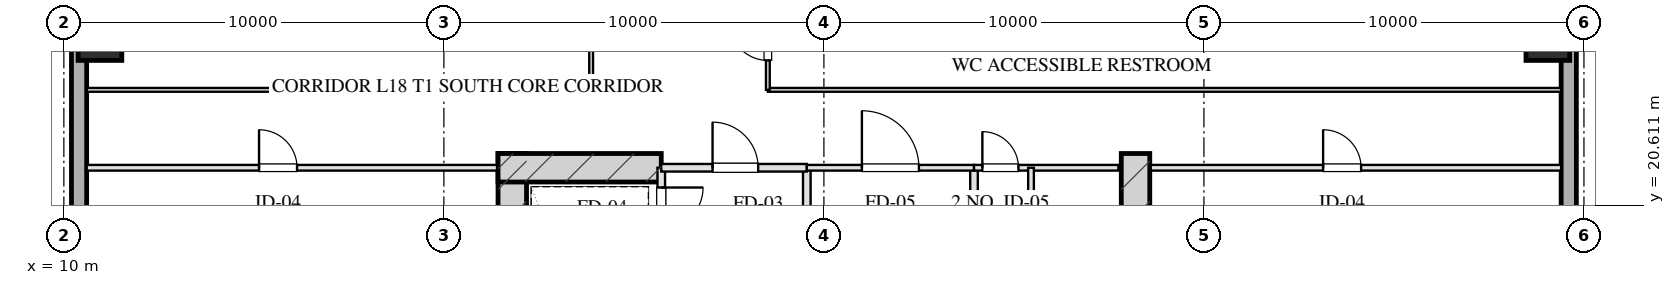
"""IFC4 building model, lengths in metres.
Left out: names, types, materials, properties, quantities, classifications, styles, units other than length and angle.
Written with IfcOpenShell. Run it as: python <this file> out.ifc"""

import sys

from ifc_helpers import new_model, si_unit, direction, frame, frame_2d, origin, origin_2d, place, context, subcontext, project, spatial, rectangle, hollow_rectangle, extrude, element, fill, save


model = new_model("IFC4")
c1 = context("Model", 3, precision=1e-05, world=origin(), true_north=direction((0.0, 1.0)))
c2 = subcontext(c1, "Body", "Model", "MODEL_VIEW")
j1 = project(units=[si_unit("LENGTHUNIT", "METRE"), si_unit("PLANEANGLEUNIT", "RADIAN")], contexts=[c1])
p1 = place(None, origin())
s1 = spatial("IfcSite", under=j1, at=p1, CompositionType="ELEMENT")
p2 = place(p1, origin())
s2 = spatial("IfcBuilding", under=s1, at=p2, CompositionType="ELEMENT")
p3 = place(p2, frame((0.0, 0.0, 74.75)))
s3 = spatial("IfcBuildingStorey", under=s2, at=p3, CompositionType="ELEMENT", Elevation=74.75)
for number, where, z_axis, x_axis in (
    (1, (21.8, 21.975, 0.0), (0.0, 0.0, 1.0), (0.0, -1.0, 0.0)),
    (2, (38.2, 21.975, 0.0), (0.0, 0.0, 1.0), (0.0, -1.0, 0.0)),
):
    element("IfcWall", number, at=place(p3, frame(where, z_axis=z_axis, x_axis=x_axis)), inside=s3, PredefinedType="SHEAR", context=c2, shape_type="SweptSolid", body=[
        extrude(rectangle(XDim=9.63, YDim=0.75, at=frame_2d((4.815, 0.0))), origin(), (0.0, 0.0, 1.0), 3.45),
    ])
p4 = place(p3, frame((21.425, 21.6, 0.0), z_axis=(0.0, 0.0, 1.0), x_axis=(1.0, 0.0, 0.0)))
e3 = element("IfcWall", 3, at=p4, inside=s3, PredefinedType="SHEAR", context=c2, shape_type="SweptSolid", body=[
    extrude(rectangle(XDim=4.295, YDim=0.75, at=frame_2d((2.147, 0.0))), origin(), (0.0, 0.0, 1.0), 3.45),
])
for number, where, z_axis, x_axis in (
    (4, (10.95, 25.0, 0.0), (0.0, 0.0, 1.0), (1.0, 0.0, 0.0)),
    (5, (49.05, 25.0, 0.0), (0.0, 0.0, 1.0), (1.0, 0.0, 0.0)),
):
    element("IfcColumn", number, at=place(p3, frame(where, z_axis=z_axis, x_axis=x_axis)), inside=s3, PredefinedType="COLUMN", context=c2, shape_type="SweptSolid", body=[
        extrude(hollow_rectangle(XDim=1.15, YDim=1.15, WallThickness=0.04, at=origin_2d()), origin(), (0.0, 0.0, 1.0), 3.451),
    ])
p5 = place(p3, frame((10.4, 7.2, 0.0), z_axis=(0.0, 0.0, 1.0), x_axis=(0.0, 1.0, 0.0)))
e6 = element("IfcWall", 6, at=p5, inside=s3, PredefinedType="SOLIDWALL", context=c2, shape_type="SweptSolid", body=[
    extrude(rectangle(XDim=53.6, YDim=0.4, at=frame_2d((26.8, 0.0))), origin(), (0.0, 0.0, 1.0), 2.61),
])
p6 = place(p5, frame((19.15, 0.0, 0.75)))
e7 = element("IfcOpeningElement", 7, at=p6, cuts=e6, PredefinedType="OPENING", context=c2, shape_type="SweptSolid", body=[
    extrude(rectangle(XDim=2.5, YDim=1.46, at=frame_2d((1.25, 0.73))), frame((0.0, 0.21, 0.0), z_axis=(0.0, -1.0, 0.0), x_axis=(1.0, 0.0, 0.0)), (0.0, 0.0, 1.0), 0.42),
])
p7 = place(p5, frame((28.15, 0.0, 0.75)))
e8 = element("IfcOpeningElement", 8, at=p7, cuts=e6, PredefinedType="OPENING", context=c2, shape_type="SweptSolid", body=[
    extrude(rectangle(XDim=2.5, YDim=1.46, at=frame_2d((1.25, 0.73))), frame((0.0, 0.21, 0.0), z_axis=(0.0, -1.0, 0.0), x_axis=(1.0, 0.0, 0.0)), (0.0, 0.0, 1.0), 0.42),
])
p8 = place(p5, frame((31.95, 0.0, 0.75)))
e9 = element("IfcOpeningElement", 9, at=p8, cuts=e6, PredefinedType="OPENING", context=c2, shape_type="SweptSolid", body=[
    extrude(rectangle(XDim=2.5, YDim=1.46, at=frame_2d((1.25, 0.73))), frame((0.0, 0.21, 0.0), z_axis=(0.0, -1.0, 0.0), x_axis=(1.0, 0.0, 0.0)), (0.0, 0.0, 1.0), 0.42),
])
p9 = place(p3, frame((49.6, 60.8, 0.0), z_axis=(0.0, 0.0, 1.0), x_axis=(0.0, -1.0, 0.0)))
e10 = element("IfcWall", 10, at=p9, inside=s3, PredefinedType="SOLIDWALL", context=c2, shape_type="SweptSolid", body=[
    extrude(rectangle(XDim=53.6, YDim=0.4, at=frame_2d((26.8, 0.0))), origin(), (0.0, 0.0, 1.0), 2.61),
])
p10 = place(p3, frame((25.72, 21.6, 0.0), z_axis=(0.0, 0.0, 1.0), x_axis=(0.0, -1.0, 0.0)))
e11 = element("IfcWall", 11, at=p10, inside=s3, PredefinedType="PARTITIONING", context=c2, shape_type="SweptSolid", body=[
    extrude(rectangle(XDim=1.9, YDim=0.2, at=frame_2d((0.95, 0.0))), origin(), (0.0, 0.0, 1.0), 3.175),
])
p11 = place(p10, frame((0.52, 0.0, 0.0)))
e12 = element("IfcOpeningElement", 12, at=p11, cuts=e11, PredefinedType="OPENING", context=c2, shape_type="SweptSolid", body=[
    extrude(rectangle(XDim=1.1, YDim=2.05, at=frame_2d((0.55, 1.025))), frame((0.0, 0.11, 0.0), z_axis=(0.0, -1.0, 0.0), x_axis=(1.0, 0.0, 0.0)), (0.0, 0.0, 1.0), 0.22),
])
p12 = place(p3, frame((29.55, 21.6, 0.0), z_axis=(0.0, 0.0, 1.0), x_axis=(0.0, -1.0, 0.0)))
e13 = element("IfcWall", 13, at=p12, inside=s3, PredefinedType="PARTITIONING", context=c2, shape_type="SweptSolid", body=[
    extrude(rectangle(XDim=8.43, YDim=0.2, at=frame_2d((4.215, 0.0))), origin(), (0.0, 0.0, 1.0), 3.175),
])
p13 = place(p3, frame((25.72, 21.6, 0.0), z_axis=(0.0, 0.0, 1.0), x_axis=(1.0, 0.0, 0.0)))
e14 = element("IfcWall", 14, at=p13, inside=s3, PredefinedType="PARTITIONING", context=c2, shape_type="SweptSolid", body=[
    extrude(rectangle(XDim=3.83, YDim=0.2, at=frame_2d((1.915, 0.0))), origin(), (0.0, 0.0, 1.0), 3.175),
])
p14 = place(p13, frame((1.35, 0.0, 0.0)))
e15 = element("IfcOpeningElement", 15, at=p14, cuts=e14, PredefinedType="OPENING", context=c2, shape_type="SweptSolid", body=[
    extrude(rectangle(XDim=1.2, YDim=2.05, at=frame_2d((0.6, 1.025))), frame((0.0, 0.11, 0.0), z_axis=(0.0, -1.0, 0.0), x_axis=(1.0, 0.0, 0.0)), (0.0, 0.0, 1.0), 0.22),
])
p15 = place(p3, frame((33.95, 21.6, 0.0), z_axis=(0.0, 0.0, 1.0), x_axis=(0.0, -1.0, 0.0)))
e16 = element("IfcWall", 16, at=p15, inside=s3, PredefinedType="PARTITIONING", context=c2, shape_type="SweptSolid", body=[
    extrude(rectangle(XDim=8.43, YDim=0.2, at=frame_2d((4.215, 0.0))), origin(), (0.0, 0.0, 1.0), 3.175),
])
p16 = place(p3, frame((29.55, 21.6, 0.0), z_axis=(0.0, 0.0, 1.0), x_axis=(1.0, 0.0, 0.0)))
e17 = element("IfcWall", 17, at=p16, inside=s3, PredefinedType="PARTITIONING", context=c2, shape_type="SweptSolid", body=[
    extrude(rectangle(XDim=4.4, YDim=0.15, at=frame_2d((2.2, 0.0))), origin(), (0.0, 0.0, 1.0), 3.175),
])
p17 = place(p16, frame((1.45, 0.0, 0.0)))
e18 = element("IfcOpeningElement", 18, at=p17, cuts=e17, PredefinedType="OPENING", context=c2, shape_type="SweptSolid", body=[
    extrude(rectangle(XDim=1.5, YDim=2.05, at=frame_2d((0.75, 1.025))), frame((0.0, 0.085, 0.0), z_axis=(0.0, -1.0, 0.0), x_axis=(1.0, 0.0, 0.0)), (0.0, 0.0, 1.0), 0.17),
])
p18 = place(p3, frame((33.95, 21.6, 0.0), z_axis=(0.0, 0.0, 1.0), x_axis=(1.0, 0.0, 0.0)))
e19 = element("IfcWall", 19, at=p18, inside=s3, PredefinedType="PARTITIONING", context=c2, shape_type="SweptSolid", body=[
    extrude(rectangle(XDim=3.8, YDim=0.15, at=frame_2d((1.9, 0.0))), origin(), (0.0, 0.0, 1.0), 3.175),
])
p19 = place(p18, frame((0.22, 0.0, 0.0)))
e20 = element("IfcOpeningElement", 20, at=p19, cuts=e19, PredefinedType="OPENING", context=c2, shape_type="SweptSolid", body=[
    extrude(rectangle(XDim=0.95, YDim=2.05, at=frame_2d((0.475, 1.025))), frame((0.0, 0.085, 0.0), z_axis=(0.0, -1.0, 0.0), x_axis=(1.0, 0.0, 0.0)), (0.0, 0.0, 1.0), 0.17),
])
p20 = place(p3, frame((35.45, 21.6, 0.0), z_axis=(0.0, 0.0, 1.0), x_axis=(0.0, -1.0, 0.0)))
e21 = element("IfcWall", 21, at=p20, inside=s3, PredefinedType="PARTITIONING", context=c2, shape_type="SweptSolid", body=[
    extrude(rectangle(XDim=8.43, YDim=0.15, at=frame_2d((4.215, 0.0))), origin(), (0.0, 0.0, 1.0), 2.765),
])
p21 = place(p20, frame((2.55, 0.0, 0.0)))
e22 = element("IfcOpeningElement", 22, at=p21, cuts=e21, PredefinedType="OPENING", context=c2, shape_type="SweptSolid", body=[
    extrude(rectangle(XDim=0.95, YDim=2.05, at=frame_2d((0.475, 1.025))), frame((0.0, 0.085, 0.0), z_axis=(0.0, -1.0, 0.0), x_axis=(1.0, 0.0, 0.0)), (0.0, 0.0, 1.0), 0.17),
])
p22 = place(p20, frame((5.8, 0.0, 0.0)))
e23 = element("IfcOpeningElement", 23, at=p22, cuts=e21, PredefinedType="OPENING", context=c2, shape_type="SweptSolid", body=[
    extrude(rectangle(XDim=0.9, YDim=2.05, at=frame_2d((0.45, 1.025))), frame((0.0, 0.085, 0.0), z_axis=(0.0, -1.0, 0.0), x_axis=(1.0, 0.0, 0.0)), (0.0, 0.0, 1.0), 0.17),
])
p23 = place(p3, frame((10.6, 21.6, 0.0), z_axis=(0.0, 0.0, 1.0), x_axis=(1.0, 0.0, 0.0)))
e24 = element("IfcWall", 24, at=p23, inside=s3, PredefinedType="PARTITIONING", context=c2, shape_type="SweptSolid", body=[
    extrude(rectangle(XDim=10.8, YDim=0.15, at=frame_2d((5.4, 0.0))), origin(), (0.0, 0.0, 1.0), 3.175),
])
p24 = place(p23, frame((4.536, 0.0, 0.0)))
e25 = element("IfcOpeningElement", 25, at=p24, cuts=e24, PredefinedType="OPENING", context=c2, shape_type="SweptSolid", body=[
    extrude(rectangle(XDim=1.0, YDim=2.05, at=frame_2d((0.5, 1.025))), frame((0.0, 0.085, 0.0), z_axis=(0.0, -1.0, 0.0), x_axis=(1.0, 0.0, 0.0)), (0.0, 0.0, 1.0), 0.17),
])
p25 = place(p3, frame((38.6, 21.6, 0.0), z_axis=(0.0, 0.0, 1.0), x_axis=(1.0, 0.0, 0.0)))
e26 = element("IfcWall", 26, at=p25, inside=s3, PredefinedType="PARTITIONING", context=c2, shape_type="SweptSolid", body=[
    extrude(rectangle(XDim=10.8, YDim=0.15, at=frame_2d((5.4, 0.0))), origin(), (0.0, 0.0, 1.0), 3.175),
])
p26 = place(p25, frame((4.536, 0.0, 0.0)))
e27 = element("IfcOpeningElement", 27, at=p26, cuts=e26, PredefinedType="OPENING", context=c2, shape_type="SweptSolid", body=[
    extrude(rectangle(XDim=1.0, YDim=2.05, at=frame_2d((0.5, 1.025))), frame((0.0, 0.085, 0.0), z_axis=(0.0, -1.0, 0.0), x_axis=(1.0, 0.0, 0.0)), (0.0, 0.0, 1.0), 0.17),
])
p27 = place(p3, frame((10.6, 23.65, 0.0), z_axis=(0.0, 0.0, 1.0), x_axis=(1.0, 0.0, 0.0)))
e28 = element("IfcWall", 28, at=p27, inside=s3, PredefinedType="MOVABLE", context=c2, shape_type="SweptSolid", body=[
    extrude(rectangle(XDim=13.275, YDim=0.1, at=frame_2d((6.637, 0.0))), origin(), (0.0, 0.0, 1.0), 3.175),
])
p28 = place(p3, frame((28.525, 23.65, 0.0), z_axis=(0.0, 0.0, 1.0), x_axis=(1.0, 0.0, 0.0)))
e29 = element("IfcWall", 29, at=p28, inside=s3, PredefinedType="MOVABLE", context=c2, shape_type="SweptSolid", body=[
    extrude(rectangle(XDim=20.875, YDim=0.1, at=frame_2d((10.438, 0.0))), origin(), (0.0, 0.0, 1.0), 3.175),
])
p29 = place(p3, frame((23.875, 23.65, 0.0), z_axis=(0.0, 0.0, 1.0), x_axis=(0.0, 1.0, 0.0)))
e30 = element("IfcWall", 30, at=p29, inside=s3, PredefinedType="MOVABLE", context=c2, shape_type="SweptSolid", body=[
    extrude(rectangle(XDim=20.7, YDim=0.1, at=frame_2d((10.35, 0.0))), origin(), (0.0, 0.0, 1.0), 3.175),
])
p30 = place(p29, frame((4.075, 0.0, 0.0)))
e31 = element("IfcOpeningElement", 31, at=p30, cuts=e30, PredefinedType="OPENING", context=c2, shape_type="SweptSolid", body=[
    extrude(rectangle(XDim=1.05, YDim=2.05, at=frame_2d((0.525, 1.025))), frame((0.0, 0.06, 0.0), z_axis=(0.0, -1.0, 0.0), x_axis=(1.0, 0.0, 0.0)), (0.0, 0.0, 1.0), 0.12),
])
p31 = place(p29, frame((14.425, 0.0, 0.0)))
e32 = element("IfcOpeningElement", 32, at=p31, cuts=e30, PredefinedType="OPENING", context=c2, shape_type="SweptSolid", body=[
    extrude(rectangle(XDim=1.0, YDim=2.05, at=frame_2d((0.5, 1.025))), frame((0.0, 0.06, 0.0), z_axis=(0.0, -1.0, 0.0), x_axis=(1.0, 0.0, 0.0)), (0.0, 0.0, 1.0), 0.12),
])
p32 = place(p3, frame((28.525, 23.65, 0.0), z_axis=(0.0, 0.0, 1.0), x_axis=(0.0, 1.0, 0.0)))
e33 = element("IfcWall", 33, at=p32, inside=s3, PredefinedType="MOVABLE", context=c2, shape_type="SweptSolid", body=[
    extrude(rectangle(XDim=20.7, YDim=0.1, at=frame_2d((10.35, 0.0))), origin(), (0.0, 0.0, 1.0), 3.175),
])
p33 = place(p32, frame((0.775, 0.0, 0.0)))
e34 = element("IfcOpeningElement", 34, at=p33, cuts=e33, PredefinedType="OPENING", context=c2, shape_type="SweptSolid", body=[
    extrude(rectangle(XDim=1.0, YDim=2.05, at=frame_2d((0.5, 1.025))), frame((0.0, 0.06, 0.0), z_axis=(0.0, -1.0, 0.0), x_axis=(1.0, 0.0, 0.0)), (0.0, 0.0, 1.0), 0.12),
])
p34 = place(p32, frame((3.95, 0.0, 0.0)))
e35 = element("IfcOpeningElement", 35, at=p34, cuts=e33, PredefinedType="OPENING", context=c2, shape_type="SweptSolid", body=[
    extrude(rectangle(XDim=1.0, YDim=2.05, at=frame_2d((0.5, 1.025))), frame((0.0, 0.06, 0.0), z_axis=(0.0, -1.0, 0.0), x_axis=(1.0, 0.0, 0.0)), (0.0, 0.0, 1.0), 0.12),
])
p35 = place(p32, frame((7.51, 0.0, 0.0)))
e36 = element("IfcOpeningElement", 36, at=p35, cuts=e33, PredefinedType="OPENING", context=c2, shape_type="SweptSolid", body=[
    extrude(rectangle(XDim=1.0, YDim=2.05, at=frame_2d((0.5, 1.025))), frame((0.0, 0.06, 0.0), z_axis=(0.0, -1.0, 0.0), x_axis=(1.0, 0.0, 0.0)), (0.0, 0.0, 1.0), 0.12),
])
p36 = place(p32, frame((11.51, 0.0, 0.0)))
e37 = element("IfcOpeningElement", 37, at=p36, cuts=e33, PredefinedType="OPENING", context=c2, shape_type="SweptSolid", body=[
    extrude(rectangle(XDim=0.85, YDim=2.05, at=frame_2d((0.425, 1.025))), frame((0.0, 0.06, 0.0), z_axis=(0.0, -1.0, 0.0), x_axis=(1.0, 0.0, 0.0)), (0.0, 0.0, 1.0), 0.12),
])
p37 = place(p32, frame((15.75, 0.0, 0.0)))
e38 = element("IfcOpeningElement", 38, at=p37, cuts=e33, PredefinedType="OPENING", context=c2, shape_type="SweptSolid", body=[
    extrude(rectangle(XDim=1.0, YDim=2.05, at=frame_2d((0.5, 1.025))), frame((0.0, 0.06, 0.0), z_axis=(0.0, -1.0, 0.0), x_axis=(1.0, 0.0, 0.0)), (0.0, 0.0, 1.0), 0.12),
])
p38 = place(p32, frame((19.185, 0.0, 0.0)))
e39 = element("IfcOpeningElement", 39, at=p38, cuts=e33, PredefinedType="OPENING", context=c2, shape_type="SweptSolid", body=[
    extrude(rectangle(XDim=1.05, YDim=2.05, at=frame_2d((0.525, 1.025))), frame((0.0, 0.06, 0.0), z_axis=(0.0, -1.0, 0.0), x_axis=(1.0, 0.0, 0.0)), (0.0, 0.0, 1.0), 0.12),
])
p39 = place(p11, origin())
e40 = element("IfcDoor", 40, at=p39, inside=s3, OperationType="SINGLE_SWING_LEFT", PredefinedType="DOOR", context=c2, shape_type="SweptSolid", body=[
    extrude(rectangle(XDim=1.1, YDim=2.05, at=frame_2d((0.55, 1.025))), frame((0.0, 0.025, 0.0), z_axis=(0.0, -1.0, 0.0), x_axis=(1.0, 0.0, 0.0)), (0.0, 0.0, 1.0), 0.05),
])
fill(e12, e40)
p40 = place(p14, origin())
e41 = element("IfcDoor", 41, at=p40, inside=s3, OperationType="SINGLE_SWING_LEFT", PredefinedType="DOOR", context=c2, shape_type="SweptSolid", body=[
    extrude(rectangle(XDim=1.2, YDim=2.05, at=frame_2d((0.6, 1.025))), frame((0.0, 0.025, 0.0), z_axis=(0.0, -1.0, 0.0), x_axis=(1.0, 0.0, 0.0)), (0.0, 0.0, 1.0), 0.05),
])
fill(e15, e41)
p41 = place(p17, origin())
e42 = element("IfcDoor", 42, at=p41, inside=s3, OperationType="SINGLE_SWING_LEFT", PredefinedType="DOOR", context=c2, shape_type="SweptSolid", body=[
    extrude(rectangle(XDim=1.5, YDim=2.05, at=frame_2d((0.75, 1.025))), frame((0.0, 0.025, 0.0), z_axis=(0.0, -1.0, 0.0), x_axis=(1.0, 0.0, 0.0)), (0.0, 0.0, 1.0), 0.05),
])
fill(e18, e42)
p42 = place(p19, origin())
e43 = element("IfcDoor", 43, at=p42, inside=s3, OperationType="SINGLE_SWING_LEFT", PredefinedType="DOOR", context=c2, shape_type="SweptSolid", body=[
    extrude(rectangle(XDim=0.95, YDim=2.05, at=frame_2d((0.475, 1.025))), frame((0.0, 0.025, 0.0), z_axis=(0.0, -1.0, 0.0), x_axis=(1.0, 0.0, 0.0)), (0.0, 0.0, 1.0), 0.05),
])
fill(e20, e43)
p43 = place(p24, origin())
e44 = element("IfcDoor", 44, at=p43, inside=s3, OperationType="SINGLE_SWING_LEFT", PredefinedType="DOOR", context=c2, shape_type="SweptSolid", body=[
    extrude(rectangle(XDim=1.0, YDim=2.05, at=frame_2d((0.5, 1.025))), frame((0.0, 0.025, 0.0), z_axis=(0.0, -1.0, 0.0), x_axis=(1.0, 0.0, 0.0)), (0.0, 0.0, 1.0), 0.05),
])
fill(e25, e44)
p44 = place(p26, origin())
e45 = element("IfcDoor", 45, at=p44, inside=s3, OperationType="SINGLE_SWING_LEFT", PredefinedType="DOOR", context=c2, shape_type="SweptSolid", body=[
    extrude(rectangle(XDim=1.0, YDim=2.05, at=frame_2d((0.5, 1.025))), frame((0.0, 0.025, 0.0), z_axis=(0.0, -1.0, 0.0), x_axis=(1.0, 0.0, 0.0)), (0.0, 0.0, 1.0), 0.05),
])
fill(e27, e45)
p45 = place(p33, origin())
e46 = element("IfcDoor", 46, at=p45, inside=s3, OperationType="SINGLE_SWING_RIGHT", PredefinedType="DOOR", context=c2, shape_type="SweptSolid", body=[
    extrude(rectangle(XDim=1.0, YDim=2.05, at=frame_2d((0.5, 1.025))), frame((0.0, 0.025, 0.0), z_axis=(0.0, -1.0, 0.0), x_axis=(1.0, 0.0, 0.0)), (0.0, 0.0, 1.0), 0.05),
])
fill(e34, e46)
save(model, sys.argv[1])
